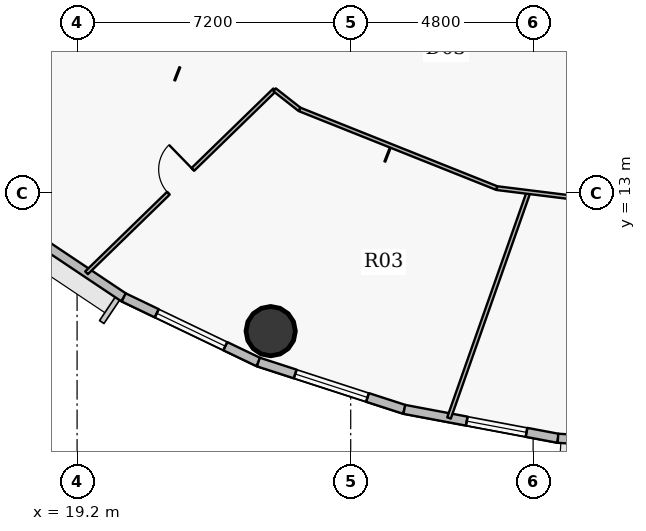
"""IFC4 building model, lengths in metres.
Left out: names, types, materials, properties, quantities, classifications, styles, units other than length and angle.
Written with IfcOpenShell. Run it as: python <this file> out.ifc"""

import sys

from ifc_helpers import new_model, si_unit, direction, frame, frame_2d, origin, origin_2d, place, context, subcontext, project, spatial, rectangle, hollow_circle, extrude, source, transform, mapped, element, fill, save


model = new_model("IFC4")
c1 = context("Model", 3, precision=1e-05, world=origin(), true_north=direction((0.0, 1.0)))
c2 = subcontext(c1, "Body", "Model", "MODEL_VIEW")
j1 = project(units=[si_unit("LENGTHUNIT", "METRE"), si_unit("PLANEANGLEUNIT", "RADIAN")], contexts=[c1])
p1 = place(None, origin())
s1 = spatial("IfcSite", under=j1, at=p1, CompositionType="ELEMENT")
p2 = place(p1, origin())
s2 = spatial("IfcBuilding", under=s1, at=p2, CompositionType="ELEMENT")
p3 = place(p2, frame((0.0, 0.0, 171.15)))
s3 = spatial("IfcBuildingStorey", under=s2, at=p3, CompositionType="ELEMENT", Elevation=171.15)
p4 = place(p3, frame((24.294, 9.369, 0.0), z_axis=(0.0, 0.0, 1.0), x_axis=(1.0, 0.0, 0.0)))
e1 = element("IfcColumn", 1, at=p4, inside=s3, PredefinedType="COLUMN", context=c2, shape_type="SweptSolid", body=[
    extrude(hollow_circle(Radius=0.65, WallThickness=0.04, at=origin_2d()), origin(), (0.0, 0.0, 1.0), 3.75),
])
p5 = place(p3, frame((20.427, 10.257, 0.0), z_axis=(0.0, 0.0, 1.0), x_axis=(-0.831228998277, 0.555930168657, 0.0)))
e2 = element("IfcWall", 2, at=p5, inside=s3, PredefinedType="SOLIDWALL", context=c2, shape_type="SweptSolid", body=[
    extrude(rectangle(XDim=3.8, YDim=0.24, at=frame_2d((1.9, 0.0))), origin(), (0.0, 0.0, 1.0), 3.5),
])
p6 = place(p3, frame((23.97, 8.556, 0.0), z_axis=(0.0, 0.0, 1.0), x_axis=(-0.901564733809, 0.432644231155, 0.0)))
e3 = element("IfcWall", 3, at=p6, inside=s3, PredefinedType="SOLIDWALL", context=c2, shape_type="SweptSolid", body=[
    extrude(rectangle(XDim=3.93, YDim=0.24, at=frame_2d((1.965, 0.0))), origin(), (0.0, 0.0, 1.0), 3.5),
])
p7 = place(p6, frame((0.965, 0.0, 0.9)))
e4 = element("IfcOpeningElement", 4, at=p7, cuts=e3, PredefinedType="OPENING", context=c2, shape_type="SweptSolid", body=[
    extrude(rectangle(XDim=2.0, YDim=1.75, at=origin_2d()), frame((1.0, 0.13, 0.875), z_axis=(0.0, -1.0, 0.0), x_axis=(1.0, 0.0, 0.0)), (0.0, 0.0, 1.0), 0.26),
])
p8 = place(p3, frame((27.811, 7.311, 0.0), z_axis=(0.0, 0.0, 1.0), x_axis=(-0.951209870236, 0.30854462038, 0.0)))
e5 = element("IfcWall", 5, at=p8, inside=s3, PredefinedType="SOLIDWALL", context=c2, shape_type="SweptSolid", body=[
    extrude(rectangle(XDim=4.038, YDim=0.24, at=frame_2d((2.019, 0.0))), origin(), (0.0, 0.0, 1.0), 3.5),
])
p9 = place(p8, frame((1.019, 0.0, 0.9)))
e6 = element("IfcOpeningElement", 6, at=p9, cuts=e5, PredefinedType="OPENING", context=c2, shape_type="SweptSolid", body=[
    extrude(rectangle(XDim=2.0, YDim=1.75, at=origin_2d()), frame((1.0, 0.13, 0.875), z_axis=(0.0, -1.0, 0.0), x_axis=(1.0, 0.0, 0.0)), (0.0, 0.0, 1.0), 0.26),
])
p10 = place(p3, frame((31.854, 6.551, 0.0), z_axis=(0.0, 0.0, 1.0), x_axis=(-0.982788108205, 0.184736391573, 0.0)))
e7 = element("IfcWall", 7, at=p10, inside=s3, PredefinedType="SOLIDWALL", context=c2, shape_type="SweptSolid", body=[
    extrude(rectangle(XDim=4.114, YDim=0.24, at=frame_2d((2.057, 0.0))), origin(), (0.0, 0.0, 1.0), 3.5),
])
p11 = place(p10, frame((0.842, 0.0, 0.9)))
e8 = element("IfcOpeningElement", 8, at=p11, cuts=e7, PredefinedType="OPENING", context=c2, shape_type="SweptSolid", body=[
    extrude(rectangle(XDim=1.6, YDim=1.75, at=origin_2d()), frame((0.8, 0.13, 0.875), z_axis=(0.0, -1.0, 0.0), x_axis=(1.0, 0.0, 0.0)), (0.0, 0.0, 1.0), 0.26),
])
p12 = place(p3, frame((36.0, 6.295, 0.0), z_axis=(0.0, 0.0, 1.0), x_axis=(-0.998104600619, 0.061540281305, 0.0)))
e9 = element("IfcWall", 9, at=p12, inside=s3, PredefinedType="SOLIDWALL", context=c2, shape_type="SweptSolid", body=[
    extrude(rectangle(XDim=4.154, YDim=0.24, at=frame_2d((2.077, 0.0))), origin(), (0.0, 0.0, 1.0), 3.5),
])
p13 = place(p12, frame((1.077, 0.0, 0.9)))
e10 = element("IfcOpeningElement", 10, at=p13, cuts=e9, PredefinedType="OPENING", context=c2, shape_type="SweptSolid", body=[
    extrude(rectangle(XDim=2.0, YDim=1.75, at=origin_2d()), frame((1.0, 0.13, 0.875), z_axis=(0.0, -1.0, 0.0), x_axis=(1.0, 0.0, 0.0)), (0.0, 0.0, 1.0), 0.26),
])
p14 = place(p3, frame((19.449, 10.905, 0.0), z_axis=(0.0, 0.0, 1.0), x_axis=(0.716921274016, 0.697154134222, 0.0)))
e11 = element("IfcWall", 11, at=p14, inside=s3, PredefinedType="PARTITIONING", context=c2, shape_type="SweptSolid", body=[
    extrude(rectangle(XDim=6.904, YDim=0.1, at=frame_2d((3.452, 0.0))), origin(), (0.0, 0.0, 1.0), 2.935),
])
p15 = place(p14, frame((3.002, 0.0, 0.0)))
e12 = element("IfcOpeningElement", 12, at=p15, cuts=e11, PredefinedType="OPENING", context=c2, shape_type="SweptSolid", body=[
    extrude(rectangle(XDim=0.9, YDim=2.1, at=origin_2d()), frame((0.45, 0.06, 1.05), z_axis=(0.0, -1.0, 0.0), x_axis=(1.0, 0.0, 0.0)), (0.0, 0.0, 1.0), 0.12),
])
p16 = place(p3, frame((24.399, 15.718, 0.0), z_axis=(0.0, 0.0, 1.0), x_axis=(0.787251731647, -0.616631746684, 0.0)))
e13 = element("IfcWall", 13, at=p16, inside=s3, PredefinedType="PARTITIONING", context=c2, shape_type="SweptSolid", body=[
    extrude(rectangle(XDim=0.834, YDim=0.1, at=frame_2d((0.417, 0.0))), origin(), (0.0, 0.0, 1.0), 3.5),
])
p17 = place(p3, frame((25.055, 15.204, 0.0), z_axis=(0.0, 0.0, 1.0), x_axis=(0.928798710424, -0.370584613166, 0.0)))
e14 = element("IfcWall", 14, at=p17, inside=s3, PredefinedType="PARTITIONING", context=c2, shape_type="SweptSolid", body=[
    extrude(rectangle(XDim=5.589, YDim=0.1, at=frame_2d((2.794, 0.0))), origin(), (0.0, 0.0, 1.0), 2.935),
])
p18 = place(p3, frame((28.987, 7.084, 0.0), z_axis=(0.0, 0.0, 1.0), x_axis=(0.332161523942, 0.943222519882, 0.0)))
e15 = element("IfcWall", 15, at=p18, inside=s3, PredefinedType="PARTITIONING", context=c2, shape_type="SweptSolid", body=[
    extrude(rectangle(XDim=6.303, YDim=0.1, at=frame_2d((3.151, 0.0))), origin(), (0.0, 0.0, 1.0), 2.935),
])
p19 = place(p3, frame((30.246, 13.133, 0.0), z_axis=(0.0, 0.0, 1.0), x_axis=(0.992396615981, -0.123081097612, 0.0)))
e16 = element("IfcWall", 16, at=p19, inside=s3, PredefinedType="PARTITIONING", context=c2, shape_type="SweptSolid", body=[
    extrude(rectangle(XDim=5.798, YDim=0.1, at=frame_2d((2.899, 0.0))), origin(), (0.0, 0.0, 1.0), 2.935),
])
p20 = place(p19, frame((2.371, 0.0, 0.0)))
e17 = element("IfcOpeningElement", 17, at=p20, cuts=e16, PredefinedType="OPENING", context=c2, shape_type="SweptSolid", body=[
    extrude(rectangle(XDim=0.9, YDim=2.1, at=origin_2d()), frame((0.45, 0.06, 1.05), z_axis=(0.0, -1.0, 0.0), x_axis=(1.0, 0.0, 0.0)), (0.0, 0.0, 1.0), 0.12),
])
m1 = source(origin(), c2, "Body", "SweptSolid", [
    extrude(rectangle(XDim=2.0, YDim=1.75, at=origin_2d()), frame((1.0, 0.03, 0.875), z_axis=(0.0, -1.0, 0.0), x_axis=(1.0, 0.0, 0.0)), (0.0, 0.0, 1.0), 0.06),
])
p21 = place(p7, origin())
e18 = element("IfcWindow", 18, at=p21, inside=s3, PartitioningType="DOUBLE_PANEL_VERTICAL", PredefinedType="WINDOW", context=c2, shape_type="MappedRepresentation", body=[
    mapped(m1, transform((0.0, 0.0, 0.0), x_axis=(1.0, 0.0, 0.0), y_axis=(0.0, 1.0, 0.0), z_axis=(0.0, 0.0, 1.0), scale=1.0)),
])
fill(e4, e18)
p22 = place(p9, origin())
e19 = element("IfcWindow", 19, at=p22, inside=s3, PartitioningType="DOUBLE_PANEL_VERTICAL", PredefinedType="WINDOW", context=c2, shape_type="MappedRepresentation", body=[
    mapped(m1, transform((0.0, 0.0, 0.0), x_axis=(1.0, 0.0, 0.0), y_axis=(0.0, 1.0, 0.0), z_axis=(0.0, 0.0, 1.0), scale=1.0)),
])
fill(e6, e19)
m2 = source(origin(), c2, "Body", "SweptSolid", [
    extrude(rectangle(XDim=1.6, YDim=1.75, at=origin_2d()), frame((0.8, 0.03, 0.875), z_axis=(0.0, -1.0, 0.0), x_axis=(1.0, 0.0, 0.0)), (0.0, 0.0, 1.0), 0.06),
])
p23 = place(p11, origin())
e20 = element("IfcWindow", 20, at=p23, inside=s3, PartitioningType="DOUBLE_PANEL_VERTICAL", PredefinedType="WINDOW", context=c2, shape_type="MappedRepresentation", body=[
    mapped(m2, transform((0.0, 0.0, 0.0), x_axis=(1.0, 0.0, 0.0), y_axis=(0.0, 1.0, 0.0), z_axis=(0.0, 0.0, 1.0), scale=1.0)),
])
fill(e8, e20)
m3 = source(origin(), c2, "Body", "SweptSolid", [
    extrude(rectangle(XDim=0.9, YDim=2.1, at=origin_2d()), frame((0.45, 0.025, 1.05), z_axis=(0.0, -1.0, 0.0), x_axis=(1.0, 0.0, 0.0)), (0.0, 0.0, 1.0), 0.05),
])
p24 = place(p15, origin())
e21 = element("IfcDoor", 21, at=p24, inside=s3, OperationType="SINGLE_SWING_RIGHT", PredefinedType="DOOR", context=c2, shape_type="MappedRepresentation", body=[
    mapped(m3, transform((0.0, 0.0, 0.0), x_axis=(1.0, 0.0, 0.0), y_axis=(0.0, 1.0, 0.0), z_axis=(0.0, 0.0, 1.0), scale=1.0)),
])
fill(e12, e21)
save(model, sys.argv[1])
